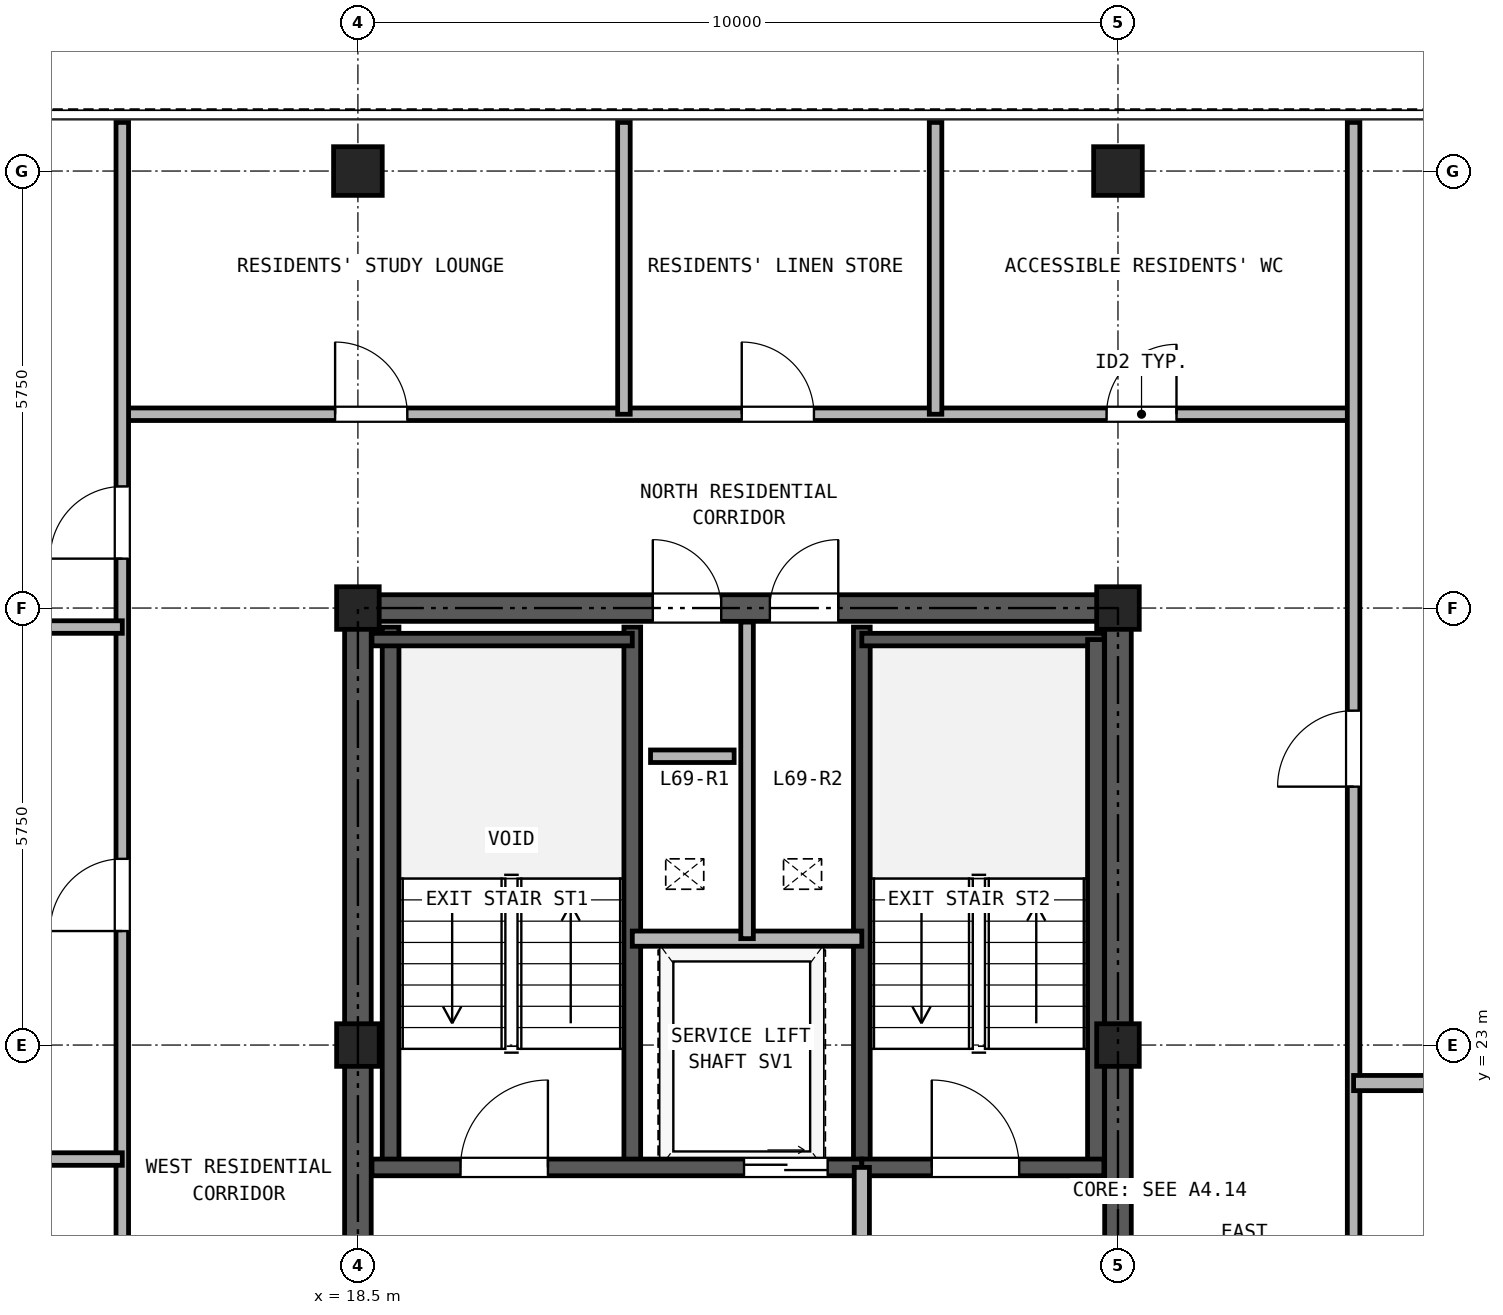
"""IFC4 building model, lengths in metres.
Left out: names, types, materials, properties, quantities, classifications, styles, units other than length and angle.
Written with IfcOpenShell. Run it as: python <this file> out.ifc"""

import sys

from ifc_helpers import new_model, si_unit, direction, frame, frame_2d, origin, origin_2d, place, context, subcontext, project, spatial, rectangle, hollow_rectangle, extrude, source, transform, mapped, element, fill, save


model = new_model("IFC4")
c1 = context("Model", 3, precision=1e-05, world=origin(), true_north=direction((0.0, 1.0)))
c2 = subcontext(c1, "Body", "Model", "MODEL_VIEW")
j1 = project(units=[si_unit("LENGTHUNIT", "METRE"), si_unit("PLANEANGLEUNIT", "RADIAN")], contexts=[c1])
p1 = place(None, origin())
s1 = spatial("IfcSite", under=j1, at=p1, CompositionType="ELEMENT")
p2 = place(p1, origin())
s2 = spatial("IfcBuilding", under=s1, at=p2, CompositionType="ELEMENT")
p3 = place(p2, frame((0.0, 0.0, 242.5)))
s3 = spatial("IfcBuildingStorey", under=s2, at=p3, CompositionType="ELEMENT", Elevation=242.5)
m1 = source(origin(), c2, "Body", "SweptSolid", [
    extrude(hollow_rectangle(XDim=0.64, YDim=0.64, WallThickness=0.035, at=origin_2d()), origin(), (0.0, 0.0, 1.0), 2.98),
])
for number, where, z_axis, x_axis in (
    (1, (18.5, 34.5, 0.0), (0.0, 0.0, 1.0), (1.0, 0.0, 0.0)),
    (2, (28.5, 34.5, 0.0), (0.0, 0.0, 1.0), (1.0, 0.0, 0.0)),
):
    element("IfcColumn", number, at=place(p3, frame(where, z_axis=z_axis, x_axis=x_axis)), inside=s3, PredefinedType="COLUMN", context=c2, shape_type="MappedRepresentation", body=[
        mapped(m1, transform((0.0, 0.0, 0.0), x_axis=(1.0, 0.0, 0.0), y_axis=(0.0, 1.0, 0.0), z_axis=(0.0, 0.0, 1.0), scale=1.0)),
    ])
m2 = source(origin(), c2, "Body", "SweptSolid", [
    extrude(hollow_rectangle(XDim=0.56, YDim=0.56, WallThickness=0.03, at=origin_2d()), origin(), (0.0, 0.0, 1.0), 2.98),
])
for number, where, z_axis, x_axis in (
    (3, (18.5, 23.0, 0.0), (0.0, 0.0, 1.0), (1.0, 0.0, 0.0)),
    (4, (18.5, 28.75, 0.0), (0.0, 0.0, 1.0), (1.0, 0.0, 0.0)),
    (5, (28.5, 23.0, 0.0), (0.0, 0.0, 1.0), (1.0, 0.0, 0.0)),
    (6, (28.5, 28.75, 0.0), (0.0, 0.0, 1.0), (1.0, 0.0, 0.0)),
):
    element("IfcColumn", number, at=place(p3, frame(where, z_axis=z_axis, x_axis=x_axis)), inside=s3, PredefinedType="COLUMN", context=c2, shape_type="MappedRepresentation", body=[
        mapped(m2, transform((0.0, 0.0, 0.0), x_axis=(1.0, 0.0, 0.0), y_axis=(0.0, 1.0, 0.0), z_axis=(0.0, 0.0, 1.0), scale=1.0)),
    ])
p4 = place(p3, frame((18.325, 28.75, 0.0), z_axis=(0.0, 0.0, 1.0), x_axis=(1.0, 0.0, 0.0)))
e7 = element("IfcWall", 7, at=p4, inside=s3, PredefinedType="SHEAR", context=c2, shape_type="SweptSolid", body=[
    extrude(rectangle(XDim=10.35, YDim=0.35, at=frame_2d((5.175, 0.0))), origin(), (0.0, 0.0, 1.0), 2.98),
])
p5 = place(p4, frame((4.055, 0.0, 0.0)))
e8 = element("IfcOpeningElement", 8, at=p5, cuts=e7, PredefinedType="OPENING", context=c2, shape_type="SweptSolid", body=[
    extrude(rectangle(XDim=0.9, YDim=2.05, at=frame_2d((0.45, 1.025))), frame((0.0, 0.185, 0.0), z_axis=(0.0, -1.0, 0.0), x_axis=(1.0, 0.0, 0.0)), (0.0, 0.0, 1.0), 0.37),
])
p6 = place(p4, frame((5.595, 0.0, 0.0)))
e9 = element("IfcOpeningElement", 9, at=p6, cuts=e7, PredefinedType="OPENING", context=c2, shape_type="SweptSolid", body=[
    extrude(rectangle(XDim=0.9, YDim=2.05, at=frame_2d((0.45, 1.025))), frame((0.0, 0.185, 0.0), z_axis=(0.0, -1.0, 0.0), x_axis=(1.0, 0.0, 0.0)), (0.0, 0.0, 1.0), 0.37),
])
p7 = place(p3, frame((18.5, 11.675, 0.0), z_axis=(0.0, 0.0, 1.0), x_axis=(0.0, 1.0, 0.0)))
e10 = element("IfcWall", 10, at=p7, inside=s3, PredefinedType="SHEAR", context=c2, shape_type="SweptSolid", body=[
    extrude(rectangle(XDim=16.9, YDim=0.35, at=frame_2d((8.45, 0.0))), origin(), (0.0, 0.0, 1.0), 2.98),
])
p8 = place(p7, frame((7.475, 0.0, 0.0)))
e11 = element("IfcOpeningElement", 11, at=p8, cuts=e10, PredefinedType="OPENING", context=c2, shape_type="SweptSolid", body=[
    extrude(rectangle(XDim=1.15, YDim=2.2, at=frame_2d((0.575, 1.1))), frame((0.0, 0.185, 0.0), z_axis=(0.0, -1.0, 0.0), x_axis=(1.0, 0.0, 0.0)), (0.0, 0.0, 1.0), 0.37),
])
p9 = place(p3, frame((28.5, 11.675, 0.0), z_axis=(0.0, 0.0, 1.0), x_axis=(0.0, 1.0, 0.0)))
e12 = element("IfcWall", 12, at=p9, inside=s3, PredefinedType="SHEAR", context=c2, shape_type="SweptSolid", body=[
    extrude(rectangle(XDim=16.9, YDim=0.35, at=frame_2d((8.45, 0.0))), origin(), (0.0, 0.0, 1.0), 2.98),
])
p10 = place(p9, frame((7.475, 0.0, 0.0)))
e13 = element("IfcOpeningElement", 13, at=p10, cuts=e12, PredefinedType="OPENING", context=c2, shape_type="SweptSolid", body=[
    extrude(rectangle(XDim=1.15, YDim=2.2, at=frame_2d((0.575, 1.1))), frame((0.0, 0.185, 0.0), z_axis=(0.0, -1.0, 0.0), x_axis=(1.0, 0.0, 0.0)), (0.0, 0.0, 1.0), 0.37),
])
for number, where, z_axis, x_axis in (
    (14, (18.93, 21.39, 0.0), (0.0, 0.0, 1.0), (0.0, 1.0, 0.0)),
    (15, (22.11, 21.39, 0.0), (0.0, 0.0, 1.0), (0.0, 1.0, 0.0)),
    (16, (25.13, 21.39, 0.0), (0.0, 0.0, 1.0), (0.0, 1.0, 0.0)),
):
    element("IfcWall", number, at=place(p3, frame(where, z_axis=z_axis, x_axis=x_axis)), inside=s3, PredefinedType="SOLIDWALL", context=c2, shape_type="SweptSolid", body=[
        extrude(rectangle(XDim=7.11, YDim=0.22, at=frame_2d((3.555, 0.0))), origin(), (0.0, 0.0, 1.0), 2.98),
    ])
p11 = place(p3, frame((18.685, 28.335, 0.0), z_axis=(0.0, 0.0, 1.0), x_axis=(1.0, 0.0, 0.0)))
e17 = element("IfcWall", 17, at=p11, inside=s3, PredefinedType="PARTITIONING", context=c2, shape_type="SweptSolid", body=[
    extrude(rectangle(XDim=3.425, YDim=0.165, at=frame_2d((1.712, 0.0))), origin(), (0.0, 0.0, 1.0), 2.98),
])
p12 = place(p3, frame((25.13, 28.335, 0.0), z_axis=(0.0, 0.0, 1.0), x_axis=(1.0, 0.0, 0.0)))
e18 = element("IfcWall", 18, at=p12, inside=s3, PredefinedType="PARTITIONING", context=c2, shape_type="SweptSolid", body=[
    extrude(rectangle(XDim=3.185, YDim=0.165, at=frame_2d((1.593, 0.0))), origin(), (0.0, 0.0, 1.0), 2.98),
])
p13 = place(p3, frame((28.21, 21.39, 0.0), z_axis=(0.0, 0.0, 1.0), x_axis=(0.0, 1.0, 0.0)))
e19 = element("IfcWall", 19, at=p13, inside=s3, PredefinedType="SOLIDWALL", context=c2, shape_type="SweptSolid", body=[
    extrude(rectangle(XDim=6.945, YDim=0.22, at=frame_2d((3.473, 0.0))), origin(), (0.0, 0.0, 1.0), 2.98),
])
p14 = place(p3, frame((18.685, 21.39, 0.0), z_axis=(0.0, 0.0, 1.0), x_axis=(1.0, 0.0, 0.0)))
e20 = element("IfcWall", 20, at=p14, inside=s3, PredefinedType="SOLIDWALL", context=c2, shape_type="SweptSolid", body=[
    extrude(rectangle(XDim=6.445, YDim=0.22, at=frame_2d((3.222, 0.0))), origin(), (0.0, 0.0, 1.0), 2.98),
])
p15 = place(p14, frame((1.165, 0.0, 0.0)))
e21 = element("IfcOpeningElement", 21, at=p15, cuts=e20, PredefinedType="OPENING", context=c2, shape_type="SweptSolid", body=[
    extrude(rectangle(XDim=1.15, YDim=2.2, at=frame_2d((0.575, 1.1))), frame((0.0, 0.12, 0.0), z_axis=(0.0, -1.0, 0.0), x_axis=(1.0, 0.0, 0.0)), (0.0, 0.0, 1.0), 0.24),
])
p16 = place(p14, frame((4.895, 0.0, 0.0)))
e22 = element("IfcOpeningElement", 22, at=p16, cuts=e20, PredefinedType="OPENING", context=c2, shape_type="SweptSolid", body=[
    extrude(rectangle(XDim=1.1, YDim=2.25, at=frame_2d((0.55, 1.125))), frame((0.0, 0.12, 0.0), z_axis=(0.0, -1.0, 0.0), x_axis=(1.0, 0.0, 0.0)), (0.0, 0.0, 1.0), 0.24),
])
p17 = place(p3, frame((25.13, 21.39, 0.0), z_axis=(0.0, 0.0, 1.0), x_axis=(1.0, 0.0, 0.0)))
e23 = element("IfcWall", 23, at=p17, inside=s3, PredefinedType="SOLIDWALL", context=c2, shape_type="SweptSolid", body=[
    extrude(rectangle(XDim=3.185, YDim=0.22, at=frame_2d((1.593, 0.0))), origin(), (0.0, 0.0, 1.0), 2.98),
])
p18 = place(p17, frame((0.92, 0.0, 0.0)))
e24 = element("IfcOpeningElement", 24, at=p18, cuts=e23, PredefinedType="OPENING", context=c2, shape_type="SweptSolid", body=[
    extrude(rectangle(XDim=1.15, YDim=2.2, at=frame_2d((0.575, 1.1))), frame((0.0, 0.12, 0.0), z_axis=(0.0, -1.0, 0.0), x_axis=(1.0, 0.0, 0.0)), (0.0, 0.0, 1.0), 0.24),
])
p19 = place(p3, frame((22.11, 24.4, 0.0), z_axis=(0.0, 0.0, 1.0), x_axis=(1.0, 0.0, 0.0)))
e25 = element("IfcWall", 25, at=p19, inside=s3, PredefinedType="PARTITIONING", context=c2, shape_type="SweptSolid", body=[
    extrude(rectangle(XDim=3.02, YDim=0.2, at=frame_2d((1.51, 0.0))), origin(), (0.0, 0.0, 1.0), 2.98),
])
p20 = place(p3, frame((23.62, 24.4, 0.0), z_axis=(0.0, 0.0, 1.0), x_axis=(0.0, 1.0, 0.0)))
e26 = element("IfcWall", 26, at=p20, inside=s3, PredefinedType="PARTITIONING", context=c2, shape_type="SweptSolid", body=[
    extrude(rectangle(XDim=4.165, YDim=0.165, at=frame_2d((2.083, 0.0))), origin(), (0.0, 0.0, 1.0), 2.98),
])
p21 = place(p3, frame((25.13, 18.0, 0.0), z_axis=(0.0, 0.0, 1.0), x_axis=(0.0, 1.0, 0.0)))
e27 = element("IfcWall", 27, at=p21, inside=s3, PredefinedType="PARTITIONING", context=c2, shape_type="SweptSolid", body=[
    extrude(rectangle(XDim=3.39, YDim=0.2, at=frame_2d((1.695, 0.0))), origin(), (0.0, 0.0, 1.0), 2.98),
])
p22 = place(p21, frame((1.1, 0.0, 0.0)))
e28 = element("IfcOpeningElement", 28, at=p22, cuts=e27, PredefinedType="OPENING", context=c2, shape_type="SweptSolid", body=[
    extrude(rectangle(XDim=1.15, YDim=2.2, at=frame_2d((0.575, 1.1))), frame((0.0, 0.11, 0.0), z_axis=(0.0, -1.0, 0.0), x_axis=(1.0, 0.0, 0.0)), (0.0, 0.0, 1.0), 0.22),
])
p23 = place(p3, frame((15.4, 31.3, 0.0), z_axis=(0.0, 0.0, 1.0), x_axis=(1.0, 0.0, 0.0)))
e29 = element("IfcWall", 29, at=p23, inside=s3, PredefinedType="PARTITIONING", context=c2, shape_type="SweptSolid", body=[
    extrude(rectangle(XDim=16.2, YDim=0.165, at=frame_2d((8.1, 0.0))), origin(), (0.0, 0.0, 1.0), 2.98),
])
p24 = place(p23, frame((2.8, 0.0, 0.0)))
e30 = element("IfcOpeningElement", 30, at=p24, cuts=e29, PredefinedType="OPENING", context=c2, shape_type="SweptSolid", body=[
    extrude(rectangle(XDim=0.95, YDim=2.15, at=frame_2d((0.475, 1.075))), frame((0.0, 0.093, 0.0), z_axis=(0.0, -1.0, 0.0), x_axis=(1.0, 0.0, 0.0)), (0.0, 0.0, 1.0), 0.185),
])
p25 = place(p23, frame((8.15, 0.0, 0.0)))
e31 = element("IfcOpeningElement", 31, at=p25, cuts=e29, PredefinedType="OPENING", context=c2, shape_type="SweptSolid", body=[
    extrude(rectangle(XDim=0.95, YDim=2.15, at=frame_2d((0.475, 1.075))), frame((0.0, 0.093, 0.0), z_axis=(0.0, -1.0, 0.0), x_axis=(1.0, 0.0, 0.0)), (0.0, 0.0, 1.0), 0.185),
])
p26 = place(p23, frame((12.95, 0.0, 0.0)))
e32 = element("IfcOpeningElement", 32, at=p26, cuts=e29, PredefinedType="OPENING", context=c2, shape_type="SweptSolid", body=[
    extrude(rectangle(XDim=0.92, YDim=2.1, at=frame_2d((0.46, 1.05))), frame((0.0, 0.093, 0.0), z_axis=(0.0, -1.0, 0.0), x_axis=(1.0, 0.0, 0.0)), (0.0, 0.0, 1.0), 0.185),
])
p27 = place(p3, frame((15.4, 10.7, 0.0), z_axis=(0.0, 0.0, 1.0), x_axis=(0.0, 1.0, 0.0)))
e33 = element("IfcWall", 33, at=p27, inside=s3, PredefinedType="PARTITIONING", context=c2, shape_type="SweptSolid", body=[
    extrude(rectangle(XDim=24.44, YDim=0.165, at=frame_2d((12.22, 0.0))), origin(), (0.0, 0.0, 1.0), 2.98),
])
p28 = place(p27, frame((4.9, 0.0, 0.0)))
e34 = element("IfcOpeningElement", 34, at=p28, cuts=e33, PredefinedType="OPENING", context=c2, shape_type="SweptSolid", body=[
    extrude(rectangle(XDim=0.95, YDim=2.15, at=frame_2d((0.475, 1.075))), frame((0.0, 0.093, 0.0), z_axis=(0.0, -1.0, 0.0), x_axis=(1.0, 0.0, 0.0)), (0.0, 0.0, 1.0), 0.185),
])
p29 = place(p27, frame((13.8, 0.0, 0.0)))
e35 = element("IfcOpeningElement", 35, at=p29, cuts=e33, PredefinedType="OPENING", context=c2, shape_type="SweptSolid", body=[
    extrude(rectangle(XDim=0.95, YDim=2.15, at=frame_2d((0.475, 1.075))), frame((0.0, 0.093, 0.0), z_axis=(0.0, -1.0, 0.0), x_axis=(1.0, 0.0, 0.0)), (0.0, 0.0, 1.0), 0.185),
])
p30 = place(p27, frame((18.7, 0.0, 0.0)))
e36 = element("IfcOpeningElement", 36, at=p30, cuts=e33, PredefinedType="OPENING", context=c2, shape_type="SweptSolid", body=[
    extrude(rectangle(XDim=0.95, YDim=2.15, at=frame_2d((0.475, 1.075))), frame((0.0, 0.093, 0.0), z_axis=(0.0, -1.0, 0.0), x_axis=(1.0, 0.0, 0.0)), (0.0, 0.0, 1.0), 0.185),
])
p31 = place(p3, frame((31.6, 10.7, 0.0), z_axis=(0.0, 0.0, 1.0), x_axis=(0.0, 1.0, 0.0)))
e37 = element("IfcWall", 37, at=p31, inside=s3, PredefinedType="PARTITIONING", context=c2, shape_type="SweptSolid", body=[
    extrude(rectangle(XDim=24.44, YDim=0.165, at=frame_2d((12.22, 0.0))), origin(), (0.0, 0.0, 1.0), 2.98),
])
p32 = place(p31, frame((5.4, 0.0, 0.0)))
e38 = element("IfcOpeningElement", 38, at=p32, cuts=e37, PredefinedType="OPENING", context=c2, shape_type="SweptSolid", body=[
    extrude(rectangle(XDim=1.0, YDim=2.15, at=frame_2d((0.5, 1.075))), frame((0.0, 0.093, 0.0), z_axis=(0.0, -1.0, 0.0), x_axis=(1.0, 0.0, 0.0)), (0.0, 0.0, 1.0), 0.185),
])
p33 = place(p31, frame((15.7, 0.0, 0.0)))
e39 = element("IfcOpeningElement", 39, at=p33, cuts=e37, PredefinedType="OPENING", context=c2, shape_type="SweptSolid", body=[
    extrude(rectangle(XDim=1.0, YDim=2.15, at=frame_2d((0.5, 1.075))), frame((0.0, 0.093, 0.0), z_axis=(0.0, -1.0, 0.0), x_axis=(1.0, 0.0, 0.0)), (0.0, 0.0, 1.0), 0.185),
])
p34 = place(p3, frame((5.36, 21.5, 0.0), z_axis=(0.0, 0.0, 1.0), x_axis=(1.0, 0.0, 0.0)))
e40 = element("IfcWall", 40, at=p34, inside=s3, PredefinedType="PARTITIONING", context=c2, shape_type="SweptSolid", body=[
    extrude(rectangle(XDim=10.04, YDim=0.165, at=frame_2d((5.02, 0.0))), origin(), (0.0, 0.0, 1.0), 2.98),
])
p35 = place(p3, frame((5.36, 28.5, 0.0), z_axis=(0.0, 0.0, 1.0), x_axis=(1.0, 0.0, 0.0)))
e41 = element("IfcWall", 41, at=p35, inside=s3, PredefinedType="PARTITIONING", context=c2, shape_type="SweptSolid", body=[
    extrude(rectangle(XDim=10.04, YDim=0.165, at=frame_2d((5.02, 0.0))), origin(), (0.0, 0.0, 1.0), 2.428),
])
p36 = place(p3, frame((31.6, 22.5, 0.0), z_axis=(0.0, 0.0, 1.0), x_axis=(1.0, 0.0, 0.0)))
e42 = element("IfcWall", 42, at=p36, inside=s3, PredefinedType="PARTITIONING", context=c2, shape_type="SweptSolid", body=[
    extrude(rectangle(XDim=10.04, YDim=0.2, at=frame_2d((5.02, 0.0))), origin(), (0.0, 0.0, 1.0), 2.98),
])
for number, where, z_axis, x_axis in (
    (43, (22.0, 31.3, 0.0), (0.0, 0.0, 1.0), (0.0, 1.0, 0.0)),
    (44, (26.1, 31.3, 0.0), (0.0, 0.0, 1.0), (0.0, 1.0, 0.0)),
):
    element("IfcWall", number, at=place(p3, frame(where, z_axis=z_axis, x_axis=x_axis)), inside=s3, PredefinedType="PARTITIONING", context=c2, shape_type="SweptSolid", body=[
        extrude(rectangle(XDim=3.84, YDim=0.165, at=frame_2d((1.92, 0.0))), origin(), (0.0, 0.0, 1.0), 2.98),
    ])
p37 = place(p3, frame((22.35, 26.8, 0.0), z_axis=(0.0, 0.0, 1.0), x_axis=(1.0, 0.0, 0.0)))
e45 = element("IfcWall", 45, at=p37, inside=s3, PredefinedType="PARTITIONING", context=c2, shape_type="SweptSolid", body=[
    extrude(rectangle(XDim=1.1, YDim=0.165, at=frame_2d((0.55, 0.0))), origin(), (0.0, 0.0, 1.0), 2.98),
])
p38 = place(p15, frame((1.15, 0.0, 0.0), z_axis=(0.0, 0.0, 1.0), x_axis=(-1.0, 0.0, 0.0)))
e46 = element("IfcDoor", 46, at=p38, inside=s3, OperationType="SINGLE_SWING_RIGHT", PredefinedType="DOOR", context=c2, shape_type="SweptSolid", body=[
    extrude(rectangle(XDim=1.15, YDim=2.2, at=frame_2d((0.575, 1.1))), frame((0.0, 0.025, 0.0), z_axis=(0.0, -1.0, 0.0), x_axis=(1.0, 0.0, 0.0)), (0.0, 0.0, 1.0), 0.05),
])
fill(e21, e46)
p39 = place(p18, frame((1.15, 0.0, 0.0), z_axis=(0.0, 0.0, 1.0), x_axis=(-1.0, 0.0, 0.0)))
e47 = element("IfcDoor", 47, at=p39, inside=s3, OperationType="SINGLE_SWING_LEFT", PredefinedType="DOOR", context=c2, shape_type="SweptSolid", body=[
    extrude(rectangle(XDim=1.15, YDim=2.2, at=frame_2d((0.575, 1.1))), frame((0.0, 0.025, 0.0), z_axis=(0.0, -1.0, 0.0), x_axis=(1.0, 0.0, 0.0)), (0.0, 0.0, 1.0), 0.05),
])
fill(e24, e47)
p40 = place(p16, frame((1.1, 0.0, 0.0), z_axis=(0.0, 0.0, 1.0), x_axis=(-1.0, 0.0, 0.0)))
e48 = element("IfcDoor", 48, at=p40, inside=s3, OperationType="DOUBLE_DOOR_SLIDING", PredefinedType="DOOR", context=c2, shape_type="SweptSolid", body=[
    extrude(rectangle(XDim=1.1, YDim=2.25, at=frame_2d((0.55, 1.125))), frame((0.0, 0.025, 0.0), z_axis=(0.0, -1.0, 0.0), x_axis=(1.0, 0.0, 0.0)), (0.0, 0.0, 1.0), 0.05),
])
fill(e22, e48)
p41 = place(p5, origin())
e49 = element("IfcDoor", 49, at=p41, inside=s3, OperationType="SINGLE_SWING_LEFT", PredefinedType="DOOR", context=c2, shape_type="SweptSolid", body=[
    extrude(rectangle(XDim=0.9, YDim=2.05, at=frame_2d((0.45, 1.025))), frame((0.0, 0.025, 0.0), z_axis=(0.0, -1.0, 0.0), x_axis=(1.0, 0.0, 0.0)), (0.0, 0.0, 1.0), 0.05),
])
fill(e8, e49)
p42 = place(p6, origin())
e50 = element("IfcDoor", 50, at=p42, inside=s3, OperationType="SINGLE_SWING_RIGHT", PredefinedType="DOOR", context=c2, shape_type="SweptSolid", body=[
    extrude(rectangle(XDim=0.9, YDim=2.05, at=frame_2d((0.45, 1.025))), frame((0.0, 0.025, 0.0), z_axis=(0.0, -1.0, 0.0), x_axis=(1.0, 0.0, 0.0)), (0.0, 0.0, 1.0), 0.05),
])
fill(e9, e50)
p43 = place(p29, frame((0.95, 0.0, 0.0), z_axis=(0.0, 0.0, 1.0), x_axis=(-1.0, 0.0, 0.0)))
e51 = element("IfcDoor", 51, at=p43, inside=s3, OperationType="SINGLE_SWING_LEFT", PredefinedType="DOOR", context=c2, shape_type="SweptSolid", body=[
    extrude(rectangle(XDim=0.95, YDim=2.15, at=frame_2d((0.475, 1.075))), frame((0.0, 0.025, 0.0), z_axis=(0.0, -1.0, 0.0), x_axis=(1.0, 0.0, 0.0)), (0.0, 0.0, 1.0), 0.05),
])
fill(e35, e51)
p44 = place(p30, frame((0.95, 0.0, 0.0), z_axis=(0.0, 0.0, 1.0), x_axis=(-1.0, 0.0, 0.0)))
e52 = element("IfcDoor", 52, at=p44, inside=s3, OperationType="SINGLE_SWING_LEFT", PredefinedType="DOOR", context=c2, shape_type="SweptSolid", body=[
    extrude(rectangle(XDim=0.95, YDim=2.15, at=frame_2d((0.475, 1.075))), frame((0.0, 0.025, 0.0), z_axis=(0.0, -1.0, 0.0), x_axis=(1.0, 0.0, 0.0)), (0.0, 0.0, 1.0), 0.05),
])
fill(e36, e52)
p45 = place(p33, frame((1.0, 0.0, 0.0), z_axis=(0.0, 0.0, 1.0), x_axis=(-1.0, 0.0, 0.0)))
e53 = element("IfcDoor", 53, at=p45, inside=s3, OperationType="SINGLE_SWING_LEFT", PredefinedType="DOOR", context=c2, shape_type="SweptSolid", body=[
    extrude(rectangle(XDim=1.0, YDim=2.15, at=frame_2d((0.5, 1.075))), frame((0.0, 0.025, 0.0), z_axis=(0.0, -1.0, 0.0), x_axis=(1.0, 0.0, 0.0)), (0.0, 0.0, 1.0), 0.05),
])
fill(e39, e53)
p46 = place(p24, origin())
e54 = element("IfcDoor", 54, at=p46, inside=s3, OperationType="SINGLE_SWING_LEFT", PredefinedType="DOOR", context=c2, shape_type="SweptSolid", body=[
    extrude(rectangle(XDim=0.95, YDim=2.15, at=frame_2d((0.475, 1.075))), frame((0.0, 0.025, 0.0), z_axis=(0.0, -1.0, 0.0), x_axis=(1.0, 0.0, 0.0)), (0.0, 0.0, 1.0), 0.05),
])
fill(e30, e54)
p47 = place(p25, origin())
e55 = element("IfcDoor", 55, at=p47, inside=s3, OperationType="SINGLE_SWING_LEFT", PredefinedType="DOOR", context=c2, shape_type="SweptSolid", body=[
    extrude(rectangle(XDim=0.95, YDim=2.15, at=frame_2d((0.475, 1.075))), frame((0.0, 0.025, 0.0), z_axis=(0.0, -1.0, 0.0), x_axis=(1.0, 0.0, 0.0)), (0.0, 0.0, 1.0), 0.05),
])
fill(e31, e55)
p48 = place(p26, origin())
e56 = element("IfcDoor", 56, at=p48, inside=s3, OperationType="SINGLE_SWING_RIGHT", PredefinedType="DOOR", context=c2, shape_type="SweptSolid", body=[
    extrude(rectangle(XDim=0.92, YDim=2.1, at=frame_2d((0.46, 1.05))), frame((0.0, 0.025, 0.0), z_axis=(0.0, -1.0, 0.0), x_axis=(1.0, 0.0, 0.0)), (0.0, 0.0, 1.0), 0.05),
])
fill(e32, e56)
save(model, sys.argv[1])
